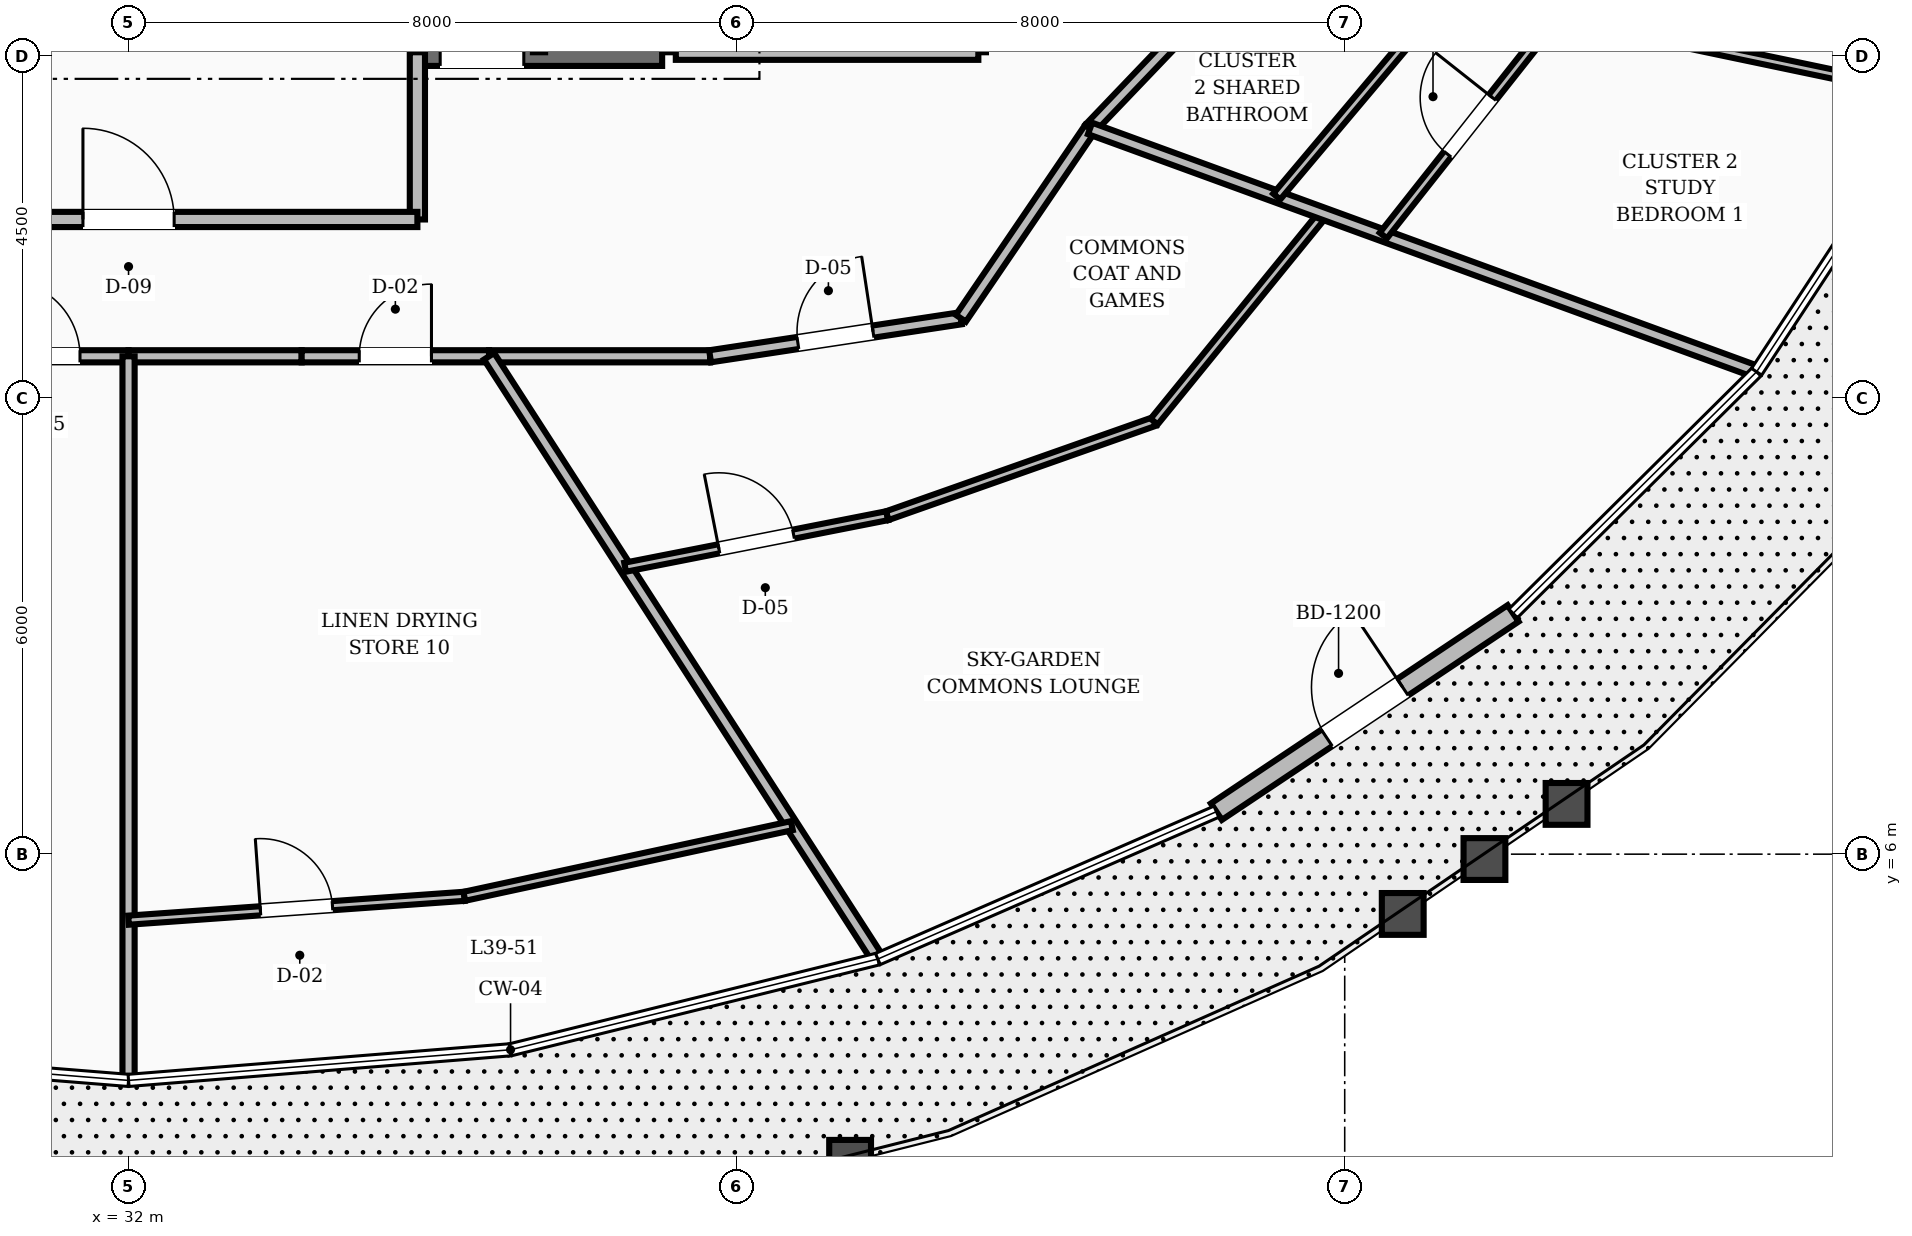
"""IFC4 building model, lengths in metres.
Left out: names, types, materials, properties, quantities, classifications, styles, units other than length and angle.
Written with IfcOpenShell. Run it as: python <this file> out.ifc"""

import sys

from ifc_helpers import new_model, si_unit, direction, frame, frame_2d, origin, place, context, subcontext, project, spatial, rectangle, extrude, element, fill, save


model = new_model("IFC4")
c1 = context("Model", 3, precision=1e-05, world=origin(), true_north=direction((0.0, 1.0)))
c2 = subcontext(c1, "Body", "Model", "MODEL_VIEW")
j1 = project(units=[si_unit("LENGTHUNIT", "METRE"), si_unit("PLANEANGLEUNIT", "RADIAN")], contexts=[c1])
p1 = place(None, origin())
s1 = spatial("IfcSite", under=j1, at=p1, CompositionType="ELEMENT")
p2 = place(p1, origin())
s2 = spatial("IfcBuilding", under=s1, at=p2, CompositionType="ELEMENT")
p3 = place(p2, frame((0.0, 0.0, 153.2)))
s3 = spatial("IfcBuildingStorey", under=s2, at=p3, CompositionType="ELEMENT", Elevation=153.2)
p4 = place(p3, frame((35.8, 16.55, 0.0), z_axis=(0.0, 0.0, 1.0), x_axis=(1.0, 0.0, 0.0)))
e1 = element("IfcWall", 1, at=p4, inside=s3, PredefinedType="SHEAR", context=c2, shape_type="SweptSolid", body=[
    extrude(rectangle(XDim=3.22, YDim=0.36, at=frame_2d((1.61, 0.0))), origin(), (0.0, 0.0, 1.0), 3.6),
])
p5 = place(p4, frame((0.3, 0.0, 0.0)))
e2 = element("IfcOpeningElement", 2, at=p5, cuts=e1, PredefinedType="OPENING", context=c2, shape_type="SweptSolid", body=[
    extrude(rectangle(XDim=1.1, YDim=2.1, at=frame_2d((0.55, 1.05))), frame((0.0, 0.19, 0.0), z_axis=(0.0, -1.0, 0.0), x_axis=(1.0, 0.0, 0.0)), (0.0, 0.0, 1.0), 0.38),
])
p6 = place(p3, frame((46.312, 6.559, 0.0), z_axis=(0.0, 0.0, 1.0), x_axis=(0.831449829395, 0.555599839092, 0.0)))
e3 = element("IfcWall", 3, at=p6, inside=s3, PredefinedType="STANDARD", context=c2, shape_type="SweptSolid", body=[
    extrude(rectangle(XDim=4.695, YDim=0.26, at=frame_2d((2.348, 0.0))), origin(), (0.0, 0.0, 1.0), 2.82),
])
p7 = place(p6, frame((1.748, 0.0, 0.0)))
e4 = element("IfcOpeningElement", 4, at=p7, cuts=e3, PredefinedType="OPENING", context=c2, shape_type="SweptSolid", body=[
    extrude(rectangle(XDim=1.2, YDim=2.15, at=frame_2d((0.6, 1.075))), frame((0.0, 0.14, 0.0), z_axis=(0.0, -1.0, 0.0), x_axis=(1.0, 0.0, 0.0)), (0.0, 0.0, 1.0), 0.28),
])
p8 = place(p3, frame((39.2, 16.55, 0.0), z_axis=(0.0, 0.0, 1.0), x_axis=(1.0, 0.0, 0.0)))
e5 = element("IfcWall", 5, at=p8, inside=s3, PredefinedType="SOLIDWALL", context=c2, shape_type="SweptSolid", body=[
    extrude(rectangle(XDim=3.98, YDim=0.2, at=frame_2d((1.99, 0.0))), origin(), (0.0, 0.0, 1.0), 2.8),
])
p9 = place(p3, frame((35.8, 14.35, 0.0), z_axis=(0.0, 0.0, 1.0), x_axis=(0.0, 1.0, 0.0)))
e6 = element("IfcWall", 6, at=p9, inside=s3, PredefinedType="SOLIDWALL", context=c2, shape_type="SweptSolid", body=[
    extrude(rectangle(XDim=2.2, YDim=0.2, at=frame_2d((1.1, 0.0))), origin(), (0.0, 0.0, 1.0), 2.8),
])
p10 = place(p3, frame((28.2, 14.35, 0.0), z_axis=(0.0, 0.0, 1.0), x_axis=(1.0, 0.0, 0.0)))
e7 = element("IfcWall", 7, at=p10, inside=s3, PredefinedType="SOLIDWALL", context=c2, shape_type="SweptSolid", body=[
    extrude(rectangle(XDim=7.6, YDim=0.2, at=frame_2d((3.8, 0.0))), origin(), (0.0, 0.0, 1.0), 2.8),
])
p11 = place(p10, frame((3.2, 0.0, 0.0)))
e8 = element("IfcOpeningElement", 8, at=p11, cuts=e7, PredefinedType="OPENING", context=c2, shape_type="SweptSolid", body=[
    extrude(rectangle(XDim=1.2, YDim=2.1, at=frame_2d((0.6, 1.05))), frame((0.0, 0.11, 0.0), z_axis=(0.0, -1.0, 0.0), x_axis=(1.0, 0.0, 0.0)), (0.0, 0.0, 1.0), 0.22),
])
p12 = place(p3, frame((29.722, 12.55, 0.0), z_axis=(0.0, 0.0, 1.0), x_axis=(1.0, 0.0, 0.0)))
e9 = element("IfcWall", 9, at=p12, inside=s3, PredefinedType="SOLIDWALL", context=c2, shape_type="SweptSolid", body=[
    extrude(rectangle(XDim=2.278, YDim=0.16, at=frame_2d((1.139, 0.0))), origin(), (0.0, 0.0, 1.0), 2.8),
])
p13 = place(p12, frame((0.639, 0.0, 0.0)))
e10 = element("IfcOpeningElement", 10, at=p13, cuts=e9, PredefinedType="OPENING", context=c2, shape_type="SweptSolid", body=[
    extrude(rectangle(XDim=1.0, YDim=2.1, at=frame_2d((0.5, 1.05))), frame((0.0, 0.09, 0.0), z_axis=(0.0, -1.0, 0.0), x_axis=(1.0, 0.0, 0.0)), (0.0, 0.0, 1.0), 0.18),
])
p14 = place(p3, frame((32.0, 12.55, 0.0), z_axis=(0.0, 0.0, 1.0), x_axis=(1.0, 0.0, 0.0)))
e11 = element("IfcWall", 11, at=p14, inside=s3, PredefinedType="SOLIDWALL", context=c2, shape_type="SweptSolid", body=[
    extrude(rectangle(XDim=2.278, YDim=0.16, at=frame_2d((1.139, 0.0))), origin(), (0.0, 0.0, 1.0), 2.8),
])
p15 = place(p3, frame((34.278, 12.55, 0.0), z_axis=(0.0, 0.0, 1.0), x_axis=(1.0, 0.0, 0.0)))
e12 = element("IfcWall", 12, at=p15, inside=s3, PredefinedType="SOLIDWALL", context=c2, shape_type="SweptSolid", body=[
    extrude(rectangle(XDim=2.465, YDim=0.16, at=frame_2d((1.232, 0.0))), origin(), (0.0, 0.0, 1.0), 2.8),
])
p16 = place(p15, frame((0.758, 0.0, 0.0)))
e13 = element("IfcOpeningElement", 13, at=p16, cuts=e12, PredefinedType="OPENING", context=c2, shape_type="SweptSolid", body=[
    extrude(rectangle(XDim=0.95, YDim=2.1, at=frame_2d((0.475, 1.05))), frame((0.0, 0.09, 0.0), z_axis=(0.0, -1.0, 0.0), x_axis=(1.0, 0.0, 0.0)), (0.0, 0.0, 1.0), 0.18),
])
p17 = place(p3, frame((36.743, 12.55, 0.0), z_axis=(0.0, 0.0, 1.0), x_axis=(1.0, 0.0, 0.0)))
e14 = element("IfcWall", 14, at=p17, inside=s3, PredefinedType="SOLIDWALL", context=c2, shape_type="SweptSolid", body=[
    extrude(rectangle(XDim=2.908, YDim=0.16, at=frame_2d((1.454, 0.0))), origin(), (0.0, 0.0, 1.0), 2.8),
])
p18 = place(p3, frame((39.651, 12.55, 0.0), z_axis=(0.0, 0.0, 1.0), x_axis=(0.988710906508, 0.149835721217, 0.0)))
e15 = element("IfcWall", 15, at=p18, inside=s3, PredefinedType="SOLIDWALL", context=c2, shape_type="SweptSolid", body=[
    extrude(rectangle(XDim=3.337, YDim=0.16, at=frame_2d((1.668, 0.0))), origin(), (0.0, 0.0, 1.0), 2.8),
])
p19 = place(p18, frame((1.168, 0.0, 0.0)))
e16 = element("IfcOpeningElement", 16, at=p19, cuts=e15, PredefinedType="OPENING", context=c2, shape_type="SweptSolid", body=[
    extrude(rectangle(XDim=1.0, YDim=2.1, at=frame_2d((0.5, 1.05))), frame((0.0, 0.09, 0.0), z_axis=(0.0, -1.0, 0.0), x_axis=(1.0, 0.0, 0.0)), (0.0, 0.0, 1.0), 0.18),
])
p20 = place(p3, frame((42.95, 13.05, 0.0), z_axis=(0.0, 0.0, 1.0), x_axis=(0.562674669208, 0.826678423955, 0.0)))
e17 = element("IfcWall", 17, at=p20, inside=s3, PredefinedType="SOLIDWALL", context=c2, shape_type="SweptSolid", body=[
    extrude(rectangle(XDim=3.021, YDim=0.16, at=frame_2d((1.511, 0.0))), origin(), (0.0, 0.0, 1.0), 2.8),
])
p21 = place(p3, frame((44.65, 15.548, 0.0), z_axis=(0.0, 0.0, 1.0), x_axis=(0.691055487108, 0.722801711216, 0.0)))
e18 = element("IfcWall", 18, at=p21, inside=s3, PredefinedType="SOLIDWALL", context=c2, shape_type="SweptSolid", body=[
    extrude(rectangle(XDim=3.184, YDim=0.16, at=frame_2d((1.592, 0.0))), origin(), (0.0, 0.0, 1.0), 2.8),
])
p22 = place(p3, frame((36.743, 12.55, 0.0), z_axis=(0.0, 0.0, 1.0), x_axis=(0.542092508386, -0.840318815898, 0.0)))
e19 = element("IfcWall", 19, at=p22, inside=s3, PredefinedType="SOLIDWALL", context=c2, shape_type="SweptSolid", body=[
    extrude(rectangle(XDim=9.386, YDim=0.16, at=frame_2d((4.693, 0.0))), origin(), (0.0, 0.0, 1.0), 2.8),
])
p23 = place(p3, frame((38.533, 9.775, 0.0), z_axis=(0.0, 0.0, 1.0), x_axis=(0.98119294685, 0.193029534142, 0.0)))
e20 = element("IfcWall", 20, at=p23, inside=s3, PredefinedType="PARTITIONING", context=c2, shape_type="SweptSolid", body=[
    extrude(rectangle(XDim=3.515, YDim=0.12, at=frame_2d((1.757, 0.0))), origin(), (0.0, 0.0, 1.0), 2.8),
])
p24 = place(p23, frame((1.258, 0.0, 0.0)))
e21 = element("IfcOpeningElement", 21, at=p24, cuts=e20, PredefinedType="OPENING", context=c2, shape_type="SweptSolid", body=[
    extrude(rectangle(XDim=1.0, YDim=2.1, at=frame_2d((0.5, 1.05))), frame((0.0, 0.07, 0.0), z_axis=(0.0, -1.0, 0.0), x_axis=(1.0, 0.0, 0.0)), (0.0, 0.0, 1.0), 0.14),
])
p25 = place(p3, frame((41.982, 10.453, 0.0), z_axis=(0.0, 0.0, 1.0), x_axis=(0.94308593852, 0.332549113013, 0.0)))
e22 = element("IfcWall", 22, at=p25, inside=s3, PredefinedType="PARTITIONING", context=c2, shape_type="SweptSolid", body=[
    extrude(rectangle(XDim=3.723, YDim=0.12, at=frame_2d((1.861, 0.0))), origin(), (0.0, 0.0, 1.0), 2.8),
])
p26 = place(p3, frame((45.493, 11.691, 0.0), z_axis=(0.0, 0.0, 1.0), x_axis=(0.631181350176, 0.775635290062, 0.0)))
e23 = element("IfcWall", 23, at=p26, inside=s3, PredefinedType="PARTITIONING", context=c2, shape_type="SweptSolid", body=[
    extrude(rectangle(XDim=3.527, YDim=0.12, at=frame_2d((1.764, 0.0))), origin(), (0.0, 0.0, 1.0), 2.8),
])
p27 = place(p3, frame((44.65, 15.548, 0.0), z_axis=(0.0, 0.0, 1.0), x_axis=(0.939358933145, -0.342935554763, 0.0)))
e24 = element("IfcWall", 24, at=p27, inside=s3, PredefinedType="SOLIDWALL", context=c2, shape_type="SweptSolid", body=[
    extrude(rectangle(XDim=9.285, YDim=0.16, at=frame_2d((4.643, 0.0))), origin(), (0.0, 0.0, 1.0), 2.8),
])
p28 = place(p3, frame((47.105, 14.651, 0.0), z_axis=(0.0, 0.0, 1.0), x_axis=(0.644148656965, 0.764900325357, 0.0)))
e25 = element("IfcWall", 25, at=p28, inside=s3, PredefinedType="PARTITIONING", context=c2, shape_type="SweptSolid", body=[
    extrude(rectangle(XDim=3.494, YDim=0.12, at=frame_2d((1.747, 0.0))), origin(), (0.0, 0.0, 1.0), 2.8),
])
p29 = place(p3, frame((48.508, 14.139, 0.0), z_axis=(0.0, 0.0, 1.0), x_axis=(0.620027462407, 0.784580107994, 0.0)))
e26 = element("IfcWall", 26, at=p29, inside=s3, PredefinedType="PARTITIONING", context=c2, shape_type="SweptSolid", body=[
    extrude(rectangle(XDim=3.677, YDim=0.12, at=frame_2d((1.838, 0.0))), origin(), (0.0, 0.0, 1.0), 2.8),
])
p30 = place(p29, frame((1.363, 0.0, 0.0)))
e27 = element("IfcOpeningElement", 27, at=p30, cuts=e26, PredefinedType="OPENING", context=c2, shape_type="SweptSolid", body=[
    extrude(rectangle(XDim=0.95, YDim=2.1, at=frame_2d((0.475, 1.05))), frame((0.0, 0.07, 0.0), z_axis=(0.0, -1.0, 0.0), x_axis=(1.0, 0.0, 0.0)), (0.0, 0.0, 1.0), 0.14),
])
p31 = place(p3, frame((50.788, 17.023, 0.0), z_axis=(0.0, 0.0, 1.0), x_axis=(0.978720068991, -0.205199967239, 0.0)))
e28 = element("IfcWall", 28, at=p31, inside=s3, PredefinedType="PARTITIONING", context=c2, shape_type="SweptSolid", body=[
    extrude(rectangle(XDim=5.071, YDim=0.12, at=frame_2d((2.535, 0.0))), origin(), (0.0, 0.0, 1.0), 2.8),
])
p32 = place(p3, frame((32.0, 12.55, 0.0), z_axis=(0.0, 0.0, 1.0), x_axis=(0.0, -1.0, 0.0)))
e29 = element("IfcWall", 29, at=p32, inside=s3, PredefinedType="SOLIDWALL", context=c2, shape_type="SweptSolid", body=[
    extrude(rectangle(XDim=9.477, YDim=0.16, at=frame_2d((4.738, 0.0))), origin(), (0.0, 0.0, 1.0), 2.8),
])
p33 = place(p3, frame((32.0, 5.132, 0.0), z_axis=(0.0, 0.0, 1.0), x_axis=(0.997483822836, 0.070894450987, 0.0)))
e30 = element("IfcWall", 30, at=p33, inside=s3, PredefinedType="PARTITIONING", context=c2, shape_type="SweptSolid", body=[
    extrude(rectangle(XDim=4.429, YDim=0.12, at=frame_2d((2.214, 0.0))), origin(), (0.0, 0.0, 1.0), 2.8),
])
p34 = place(p33, frame((1.739, 0.0, 0.0)))
e31 = element("IfcOpeningElement", 31, at=p34, cuts=e30, PredefinedType="OPENING", context=c2, shape_type="SweptSolid", body=[
    extrude(rectangle(XDim=0.95, YDim=2.1, at=frame_2d((0.475, 1.05))), frame((0.0, 0.07, 0.0), z_axis=(0.0, -1.0, 0.0), x_axis=(1.0, 0.0, 0.0)), (0.0, 0.0, 1.0), 0.14),
])
p35 = place(p3, frame((36.417, 5.446, 0.0), z_axis=(0.0, 0.0, 1.0), x_axis=(0.977517015052, 0.210856551437, 0.0)))
e32 = element("IfcWall", 32, at=p35, inside=s3, PredefinedType="PARTITIONING", context=c2, shape_type="SweptSolid", body=[
    extrude(rectangle(XDim=4.408, YDim=0.12, at=frame_2d((2.204, 0.0))), origin(), (0.0, 0.0, 1.0), 2.8),
])
p36 = place(p7, origin())
e33 = element("IfcDoor", 33, at=p36, inside=s3, OperationType="SINGLE_SWING_RIGHT", PredefinedType="DOOR", context=c2, shape_type="SweptSolid", body=[
    extrude(rectangle(XDim=1.2, YDim=2.15, at=frame_2d((0.6, 1.075))), frame((0.0, 0.025, 0.0), z_axis=(0.0, -1.0, 0.0), x_axis=(1.0, 0.0, 0.0)), (0.0, 0.0, 1.0), 0.05),
])
fill(e4, e33)
p37 = place(p5, origin())
e34 = element("IfcDoor", 34, at=p37, inside=s3, OperationType="SINGLE_SWING_RIGHT", PredefinedType="DOOR", context=c2, shape_type="SweptSolid", body=[
    extrude(rectangle(XDim=1.1, YDim=2.1, at=frame_2d((0.55, 1.05))), frame((0.0, 0.025, 0.0), z_axis=(0.0, -1.0, 0.0), x_axis=(1.0, 0.0, 0.0)), (0.0, 0.0, 1.0), 0.05),
])
fill(e2, e34)
p38 = place(p11, origin())
e35 = element("IfcDoor", 35, at=p38, inside=s3, OperationType="SINGLE_SWING_LEFT", PredefinedType="DOOR", context=c2, shape_type="SweptSolid", body=[
    extrude(rectangle(XDim=1.2, YDim=2.1, at=frame_2d((0.6, 1.05))), frame((0.0, 0.025, 0.0), z_axis=(0.0, -1.0, 0.0), x_axis=(1.0, 0.0, 0.0)), (0.0, 0.0, 1.0), 0.05),
])
fill(e8, e35)
p39 = place(p19, origin())
e36 = element("IfcDoor", 36, at=p39, inside=s3, OperationType="SINGLE_SWING_RIGHT", PredefinedType="DOOR", context=c2, shape_type="SweptSolid", body=[
    extrude(rectangle(XDim=1.0, YDim=2.1, at=frame_2d((0.5, 1.05))), frame((0.0, 0.025, 0.0), z_axis=(0.0, -1.0, 0.0), x_axis=(1.0, 0.0, 0.0)), (0.0, 0.0, 1.0), 0.05),
])
fill(e16, e36)
p40 = place(p24, origin())
e37 = element("IfcDoor", 37, at=p40, inside=s3, OperationType="SINGLE_SWING_LEFT", PredefinedType="DOOR", context=c2, shape_type="SweptSolid", body=[
    extrude(rectangle(XDim=1.0, YDim=2.1, at=frame_2d((0.5, 1.05))), frame((0.0, 0.025, 0.0), z_axis=(0.0, -1.0, 0.0), x_axis=(1.0, 0.0, 0.0)), (0.0, 0.0, 1.0), 0.05),
])
fill(e21, e37)
p41 = place(p30, origin())
e38 = element("IfcDoor", 38, at=p41, inside=s3, OperationType="SINGLE_SWING_RIGHT", PredefinedType="DOOR", context=c2, shape_type="SweptSolid", body=[
    extrude(rectangle(XDim=0.95, YDim=2.1, at=frame_2d((0.475, 1.05))), frame((0.0, 0.025, 0.0), z_axis=(0.0, -1.0, 0.0), x_axis=(1.0, 0.0, 0.0)), (0.0, 0.0, 1.0), 0.05),
])
fill(e27, e38)
p42 = place(p13, origin())
e39 = element("IfcDoor", 39, at=p42, inside=s3, OperationType="SINGLE_SWING_LEFT", PredefinedType="DOOR", context=c2, shape_type="SweptSolid", body=[
    extrude(rectangle(XDim=1.0, YDim=2.1, at=frame_2d((0.5, 1.05))), frame((0.0, 0.025, 0.0), z_axis=(0.0, -1.0, 0.0), x_axis=(1.0, 0.0, 0.0)), (0.0, 0.0, 1.0), 0.05),
])
fill(e10, e39)
p43 = place(p16, origin())
e40 = element("IfcDoor", 40, at=p43, inside=s3, OperationType="SINGLE_SWING_RIGHT", PredefinedType="DOOR", context=c2, shape_type="SweptSolid", body=[
    extrude(rectangle(XDim=0.95, YDim=2.1, at=frame_2d((0.475, 1.05))), frame((0.0, 0.025, 0.0), z_axis=(0.0, -1.0, 0.0), x_axis=(1.0, 0.0, 0.0)), (0.0, 0.0, 1.0), 0.05),
])
fill(e13, e40)
p44 = place(p34, origin())
e41 = element("IfcDoor", 41, at=p44, inside=s3, OperationType="SINGLE_SWING_LEFT", PredefinedType="DOOR", context=c2, shape_type="SweptSolid", body=[
    extrude(rectangle(XDim=0.95, YDim=2.1, at=frame_2d((0.475, 1.05))), frame((0.0, 0.025, 0.0), z_axis=(0.0, -1.0, 0.0), x_axis=(1.0, 0.0, 0.0)), (0.0, 0.0, 1.0), 0.05),
])
fill(e31, e41)
save(model, sys.argv[1])
